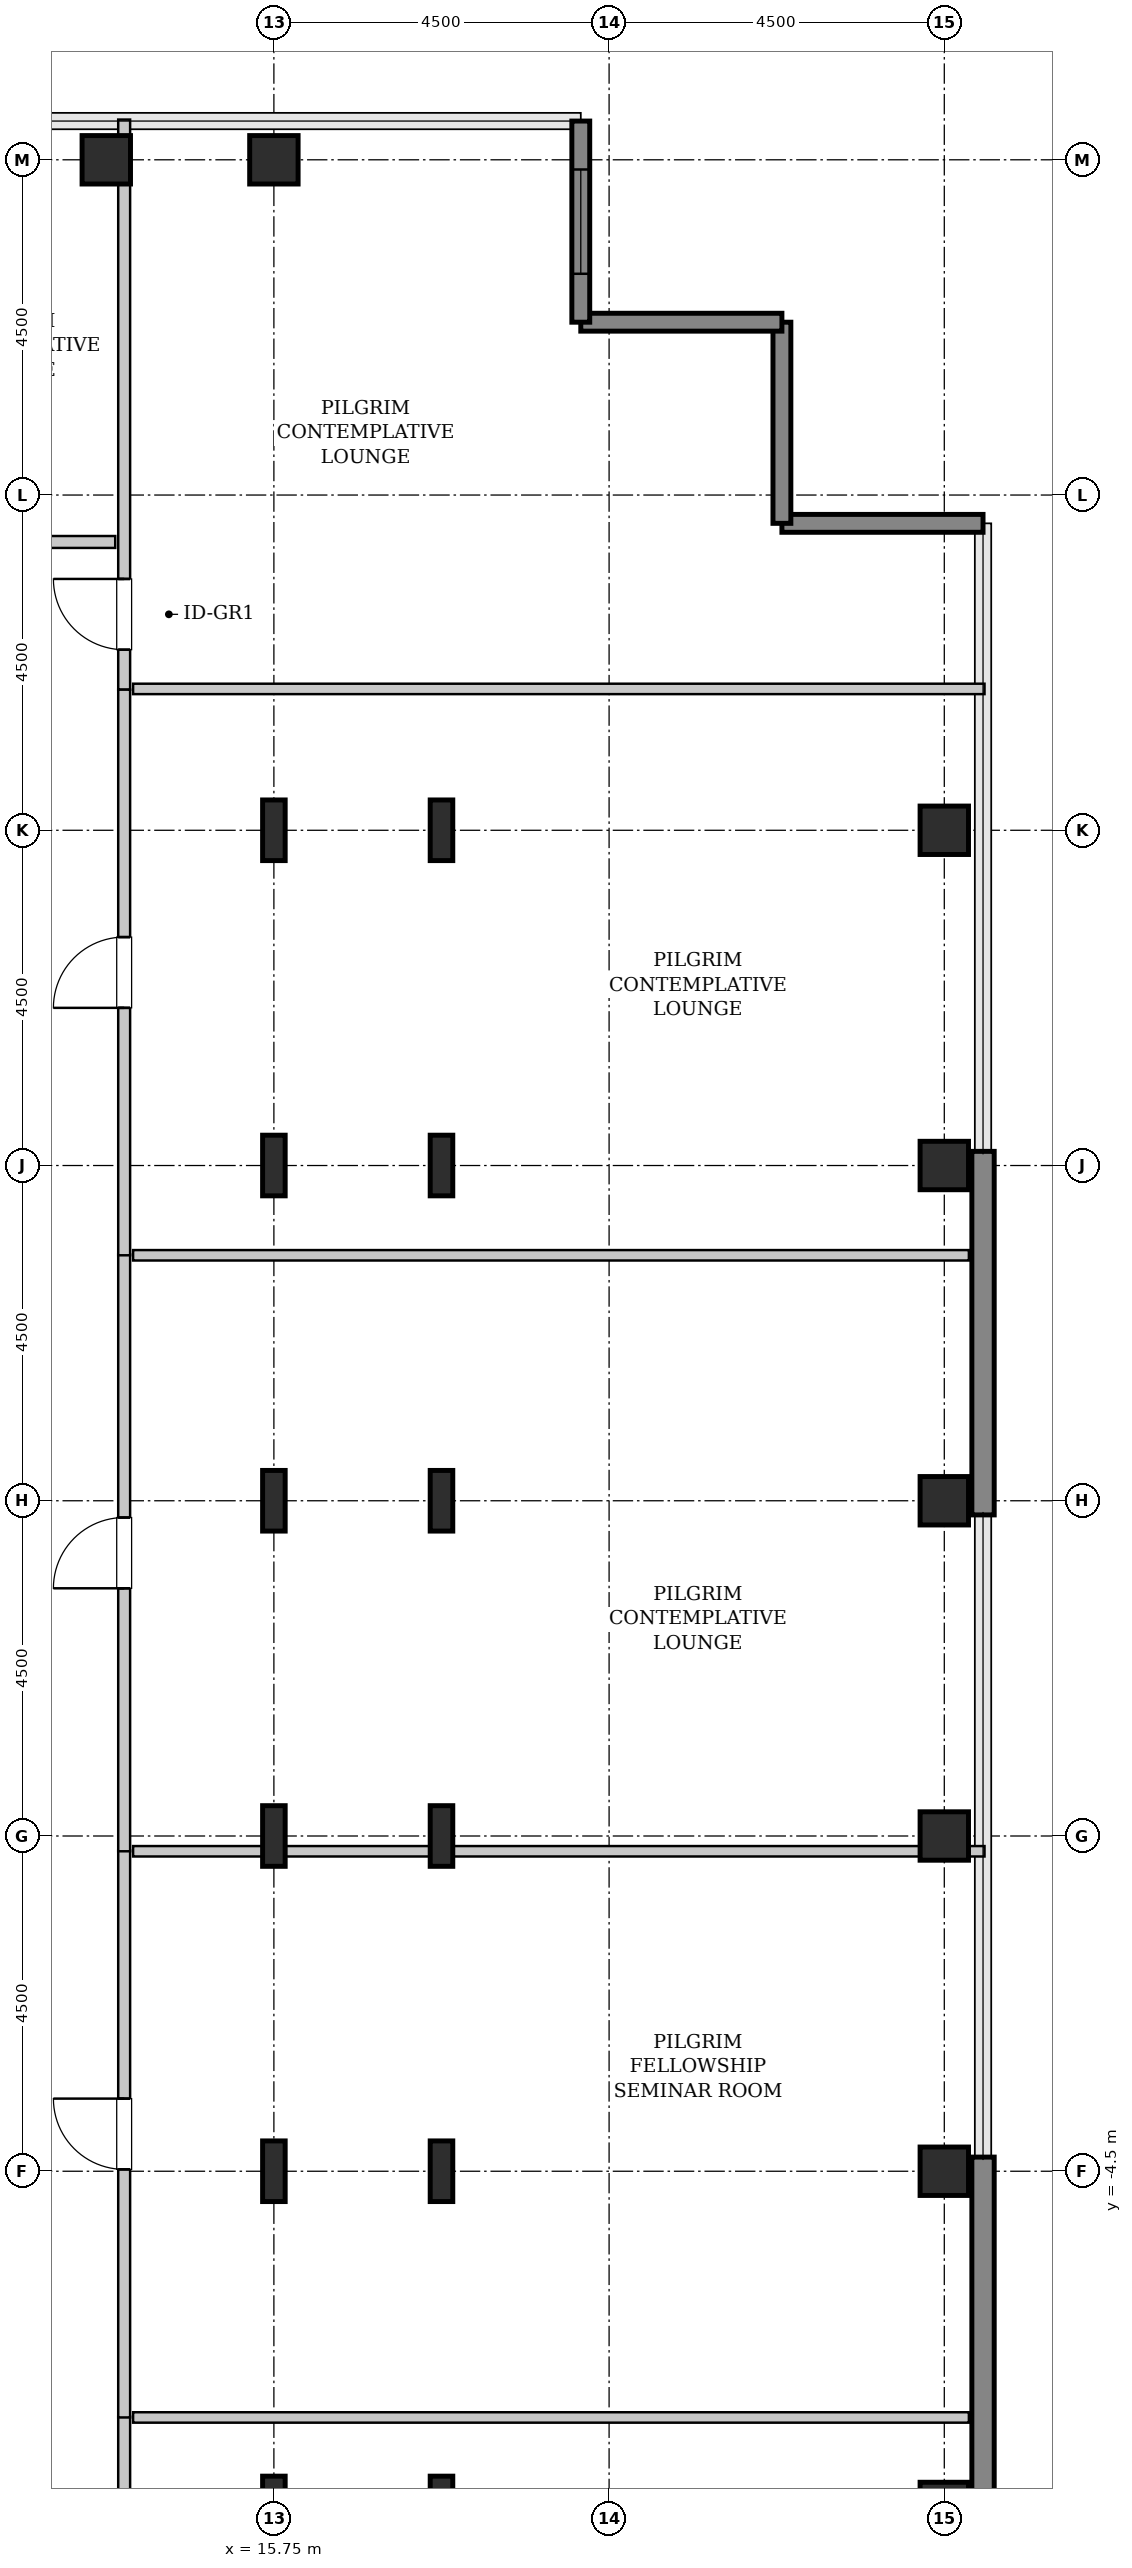
"""IFC4 building model, lengths in metres.
Left out: names, types, materials, properties, quantities, classifications, styles, units other than length and angle.
Written with IfcOpenShell. Run it as: python <this file> out.ifc"""

import sys

from ifc_helpers import new_model, si_unit, direction, frame, frame_2d, origin, origin_2d, place, context, subcontext, project, spatial, rectangle, hollow_rectangle, i_section, extrude, source, transform, mapped, element, fill, save


model = new_model("IFC4")
c1 = context("Model", 3, precision=1e-05, world=origin(), true_north=direction((0.0, 1.0)))
c2 = subcontext(c1, "Body", "Model", "MODEL_VIEW")
j1 = project(units=[si_unit("LENGTHUNIT", "METRE"), si_unit("PLANEANGLEUNIT", "RADIAN")], contexts=[c1])
p1 = place(None, origin())
s1 = spatial("IfcSite", under=j1, at=p1, CompositionType="ELEMENT")
p2 = place(p1, origin())
s2 = spatial("IfcBuilding", under=s1, at=p2, CompositionType="ELEMENT")
p3 = place(p2, frame((0.0, 0.0, 229.4)))
s3 = spatial("IfcBuildingStorey", under=s2, at=p3, CompositionType="ELEMENT", Elevation=229.4)
m1 = source(origin(), c2, "Body", "SweptSolid", [
    extrude(hollow_rectangle(XDim=0.65, YDim=0.65, WallThickness=0.032, InnerFilletRadius=0.032, OuterFilletRadius=0.064, at=origin_2d()), origin(), (0.0, 0.0, 1.0), 3.8),
])
p4 = place(p3, frame((13.5, 22.5, 0.0), z_axis=(0.0, 0.0, 1.0), x_axis=(1.0, 0.0, 0.0)))
e1 = element("IfcColumn", 1, at=p4, inside=s3, PredefinedType="COLUMN", context=c2, shape_type="MappedRepresentation", body=[
    mapped(m1, transform((0.0, 0.0, 0.0), x_axis=(1.0, 0.0, 0.0), y_axis=(0.0, 1.0, 0.0), z_axis=(0.0, 0.0, 1.0), scale=1.0)),
])
m2 = source(origin(), c2, "Body", "SweptSolid", [
    extrude(i_section(OverallWidth=0.303, OverallDepth=0.814, WebThickness=0.021, FlangeThickness=0.04, FilletRadius=0.03, at=origin_2d()), origin(), (0.0, 0.0, 1.0), 3.8),
])
for number, where, z_axis, x_axis in (
    (2, (15.75, -9.0, 0.0), (0.0, 0.0, 1.0), (1.0, 0.0, 0.0)),
    (3, (15.75, -4.5, 0.0), (0.0, 0.0, 1.0), (1.0, 0.0, 0.0)),
    (4, (15.75, 0.0, 0.0), (0.0, 0.0, 1.0), (1.0, 0.0, 0.0)),
    (5, (15.75, 4.5, 0.0), (0.0, 0.0, 1.0), (1.0, 0.0, 0.0)),
    (6, (15.75, 9.0, 0.0), (0.0, 0.0, 1.0), (1.0, 0.0, 0.0)),
    (7, (15.75, 13.5, 0.0), (0.0, 0.0, 1.0), (1.0, 0.0, 0.0)),
):
    element("IfcColumn", number, at=place(p3, frame(where, z_axis=z_axis, x_axis=x_axis)), inside=s3, PredefinedType="COLUMN", context=c2, shape_type="MappedRepresentation", body=[
        mapped(m2, transform((0.0, 0.0, 0.0), x_axis=(1.0, 0.0, 0.0), y_axis=(0.0, 1.0, 0.0), z_axis=(0.0, 0.0, 1.0), scale=1.0)),
    ])
p5 = place(p3, frame((15.75, 22.5, 0.0), z_axis=(0.0, 0.0, 1.0), x_axis=(1.0, 0.0, 0.0)))
e8 = element("IfcColumn", 8, at=p5, inside=s3, PredefinedType="COLUMN", context=c2, shape_type="MappedRepresentation", body=[
    mapped(m1, transform((0.0, 0.0, 0.0), x_axis=(1.0, 0.0, 0.0), y_axis=(0.0, 1.0, 0.0), z_axis=(0.0, 0.0, 1.0), scale=1.0)),
])
for number, where, z_axis, x_axis in (
    (9, (18.0, -9.0, 0.0), (0.0, 0.0, 1.0), (1.0, 0.0, 0.0)),
    (10, (18.0, -4.5, 0.0), (0.0, 0.0, 1.0), (1.0, 0.0, 0.0)),
    (11, (18.0, 0.0, 0.0), (0.0, 0.0, 1.0), (1.0, 0.0, 0.0)),
    (12, (18.0, 4.5, 0.0), (0.0, 0.0, 1.0), (1.0, 0.0, 0.0)),
    (13, (18.0, 9.0, 0.0), (0.0, 0.0, 1.0), (1.0, 0.0, 0.0)),
    (14, (18.0, 13.5, 0.0), (0.0, 0.0, 1.0), (1.0, 0.0, 0.0)),
):
    element("IfcColumn", number, at=place(p3, frame(where, z_axis=z_axis, x_axis=x_axis)), inside=s3, PredefinedType="COLUMN", context=c2, shape_type="MappedRepresentation", body=[
        mapped(m2, transform((0.0, 0.0, 0.0), x_axis=(1.0, 0.0, 0.0), y_axis=(0.0, 1.0, 0.0), z_axis=(0.0, 0.0, 1.0), scale=1.0)),
    ])
for number, where, z_axis, x_axis in (
    (15, (24.75, -9.0, 0.0), (0.0, 0.0, 1.0), (1.0, 0.0, 0.0)),
    (16, (24.75, -4.5, 0.0), (0.0, 0.0, 1.0), (1.0, 0.0, 0.0)),
    (17, (24.75, 0.0, 0.0), (0.0, 0.0, 1.0), (1.0, 0.0, 0.0)),
    (18, (24.75, 4.5, 0.0), (0.0, 0.0, 1.0), (1.0, 0.0, 0.0)),
    (19, (24.75, 9.0, 0.0), (0.0, 0.0, 1.0), (1.0, 0.0, 0.0)),
    (20, (24.75, 13.5, 0.0), (0.0, 0.0, 1.0), (1.0, 0.0, 0.0)),
):
    element("IfcColumn", number, at=place(p3, frame(where, z_axis=z_axis, x_axis=x_axis)), inside=s3, PredefinedType="COLUMN", context=c2, shape_type="MappedRepresentation", body=[
        mapped(m1, transform((0.0, 0.0, 0.0), x_axis=(1.0, 0.0, 0.0), y_axis=(0.0, 1.0, 0.0), z_axis=(0.0, 0.0, 1.0), scale=1.0)),
    ])
m3 = source(origin(), c2, "Body", "SweptSolid", [
    extrude(rectangle(XDim=4.88, YDim=0.3, at=frame_2d((2.44, 0.0))), origin(), (0.0, 0.0, 1.0), 3.55),
])
for number, where, z_axis, x_axis in (
    (21, (25.27, -9.19, 0.0), (0.0, 0.0, 1.0), (0.0, 1.0, 0.0)),
    (22, (25.27, 4.31, 0.0), (0.0, 0.0, 1.0), (0.0, 1.0, 0.0)),
):
    element("IfcWall", number, at=place(p3, frame(where, z_axis=z_axis, x_axis=x_axis)), inside=s3, PredefinedType="SHEAR", context=c2, shape_type="MappedRepresentation", body=[
        mapped(m3, transform((0.0, 0.0, 0.0), x_axis=(1.0, 0.0, 0.0), y_axis=(0.0, 1.0, 0.0), z_axis=(0.0, 0.0, 1.0), scale=1.0)),
    ])
m4 = source(origin(), c2, "Body", "SweptSolid", [
    extrude(rectangle(XDim=2.7, YDim=0.24, at=frame_2d((1.35, 0.0))), origin(), (0.0, 0.0, 1.0), 3.55),
])
for number, where, z_axis, x_axis in (
    (23, (25.27, 17.62, 0.0), (0.0, 0.0, 1.0), (-1.0, 0.0, 0.0)),
    (24, (22.57, 17.62, 0.0), (0.0, 0.0, 1.0), (0.0, 1.0, 0.0)),
    (25, (22.57, 20.32, 0.0), (0.0, 0.0, 1.0), (-1.0, 0.0, 0.0)),
):
    element("IfcWall", number, at=place(p3, frame(where, z_axis=z_axis, x_axis=x_axis)), inside=s3, PredefinedType="SHEAR", context=c2, shape_type="MappedRepresentation", body=[
        mapped(m4, transform((0.0, 0.0, 0.0), x_axis=(1.0, 0.0, 0.0), y_axis=(0.0, 1.0, 0.0), z_axis=(0.0, 0.0, 1.0), scale=1.0)),
    ])
p6 = place(p3, frame((19.87, 20.32, 0.0), z_axis=(0.0, 0.0, 1.0), x_axis=(0.0, 1.0, 0.0)))
e26 = element("IfcWall", 26, at=p6, inside=s3, PredefinedType="SHEAR", context=c2, shape_type="MappedRepresentation", body=[
    mapped(m4, transform((0.0, 0.0, 0.0), x_axis=(1.0, 0.0, 0.0), y_axis=(0.0, 1.0, 0.0), z_axis=(0.0, 0.0, 1.0), scale=1.0)),
])
p7 = place(p6, frame((0.65, 0.0, 0.85)))
e27 = element("IfcOpeningElement", 27, at=p7, cuts=e26, PredefinedType="OPENING", context=c2, shape_type="SweptSolid", body=[
    extrude(rectangle(XDim=1.4, YDim=1.8, at=frame_2d((0.7, 0.9))), frame((0.0, 0.13, 0.0), z_axis=(0.0, -1.0, 0.0), x_axis=(1.0, 0.0, 0.0)), (0.0, 0.0, 1.0), 0.26),
])
m5 = source(origin(), c2, "Body", "SweptSolid", [
    extrude(rectangle(XDim=7.593, YDim=0.16, at=frame_2d((3.796, 0.0))), origin(), (0.0, 0.0, 1.0), 3.535),
])
p8 = place(p3, frame((13.74, -15.387, 0.0), z_axis=(0.0, 0.0, 1.0), x_axis=(0.0, 1.0, 0.0)))
e28 = element("IfcWall", 28, at=p8, inside=s3, PredefinedType="PARTITIONING", context=c2, shape_type="MappedRepresentation", body=[
    mapped(m5, transform((0.0, 0.0, 0.0), x_axis=(1.0, 0.0, 0.0), y_axis=(0.0, 1.0, 0.0), z_axis=(0.0, 0.0, 1.0), scale=1.0)),
])
p9 = place(p8, frame((3.321, 0.0, 0.0)))
e29 = element("IfcOpeningElement", 29, at=p9, cuts=e28, PredefinedType="OPENING", context=c2, shape_type="SweptSolid", body=[
    extrude(rectangle(XDim=0.95, YDim=2.1, at=frame_2d((0.475, 1.05))), frame((0.0, 0.09, 0.0), z_axis=(0.0, -1.0, 0.0), x_axis=(1.0, 0.0, 0.0)), (0.0, 0.0, 1.0), 0.18),
])
m6 = source(origin(), c2, "Body", "SweptSolid", [
    extrude(rectangle(XDim=11.22, YDim=0.14, at=frame_2d((5.61, 0.0))), origin(), (0.0, 0.0, 1.0), 3.535),
])
p10 = place(p3, frame((13.86, -7.805, 0.0), z_axis=(0.0, 0.0, 1.0), x_axis=(1.0, 0.0, 0.0)))
e30 = element("IfcWall", 30, at=p10, inside=s3, PredefinedType="PARTITIONING", context=c2, shape_type="MappedRepresentation", body=[
    mapped(m6, transform((0.0, 0.0, 0.0), x_axis=(1.0, 0.0, 0.0), y_axis=(0.0, 1.0, 0.0), z_axis=(0.0, 0.0, 1.0), scale=1.0)),
])
m7 = source(origin(), c2, "Body", "SweptSolid", [
    extrude(rectangle(XDim=7.61, YDim=0.16, at=frame_2d((3.805, 0.0))), origin(), (0.0, 0.0, 1.0), 3.535),
])
p11 = place(p3, frame((13.74, -7.805, 0.0), z_axis=(0.0, 0.0, 1.0), x_axis=(0.0, 1.0, 0.0)))
e31 = element("IfcWall", 31, at=p11, inside=s3, PredefinedType="PARTITIONING", context=c2, shape_type="MappedRepresentation", body=[
    mapped(m7, transform((0.0, 0.0, 0.0), x_axis=(1.0, 0.0, 0.0), y_axis=(0.0, 1.0, 0.0), z_axis=(0.0, 0.0, 1.0), scale=1.0)),
])
p12 = place(p11, frame((3.33, 0.0, 0.0)))
e32 = element("IfcOpeningElement", 32, at=p12, cuts=e31, PredefinedType="OPENING", context=c2, shape_type="SweptSolid", body=[
    extrude(rectangle(XDim=0.95, YDim=2.1, at=frame_2d((0.475, 1.05))), frame((0.0, 0.09, 0.0), z_axis=(0.0, -1.0, 0.0), x_axis=(1.0, 0.0, 0.0)), (0.0, 0.0, 1.0), 0.18),
])
m8 = source(origin(), c2, "Body", "SweptSolid", [
    extrude(rectangle(XDim=11.43, YDim=0.14, at=frame_2d((5.715, 0.0))), origin(), (0.0, 0.0, 1.0), 2.925),
])
p13 = place(p3, frame((13.86, -0.205, 0.0), z_axis=(0.0, 0.0, 1.0), x_axis=(1.0, 0.0, 0.0)))
e33 = element("IfcWall", 33, at=p13, inside=s3, PredefinedType="PARTITIONING", context=c2, shape_type="MappedRepresentation", body=[
    mapped(m8, transform((0.0, 0.0, 0.0), x_axis=(1.0, 0.0, 0.0), y_axis=(0.0, 1.0, 0.0), z_axis=(0.0, 0.0, 1.0), scale=1.0)),
])
m9 = source(origin(), c2, "Body", "SweptSolid", [
    extrude(rectangle(XDim=8.01, YDim=0.16, at=frame_2d((4.005, 0.0))), origin(), (0.0, 0.0, 1.0), 3.535),
])
p14 = place(p3, frame((13.74, -0.205, 0.0), z_axis=(0.0, 0.0, 1.0), x_axis=(0.0, 1.0, 0.0)))
e34 = element("IfcWall", 34, at=p14, inside=s3, PredefinedType="PARTITIONING", context=c2, shape_type="MappedRepresentation", body=[
    mapped(m9, transform((0.0, 0.0, 0.0), x_axis=(1.0, 0.0, 0.0), y_axis=(0.0, 1.0, 0.0), z_axis=(0.0, 0.0, 1.0), scale=1.0)),
])
p15 = place(p14, frame((3.53, 0.0, 0.0)))
e35 = element("IfcOpeningElement", 35, at=p15, cuts=e34, PredefinedType="OPENING", context=c2, shape_type="SweptSolid", body=[
    extrude(rectangle(XDim=0.95, YDim=2.1, at=frame_2d((0.475, 1.05))), frame((0.0, 0.09, 0.0), z_axis=(0.0, -1.0, 0.0), x_axis=(1.0, 0.0, 0.0)), (0.0, 0.0, 1.0), 0.18),
])
p16 = place(p3, frame((13.86, 7.795, 0.0), z_axis=(0.0, 0.0, 1.0), x_axis=(1.0, 0.0, 0.0)))
e36 = element("IfcWall", 36, at=p16, inside=s3, PredefinedType="PARTITIONING", context=c2, shape_type="MappedRepresentation", body=[
    mapped(m6, transform((0.0, 0.0, 0.0), x_axis=(1.0, 0.0, 0.0), y_axis=(0.0, 1.0, 0.0), z_axis=(0.0, 0.0, 1.0), scale=1.0)),
])
m10 = source(origin(), c2, "Body", "SweptSolid", [
    extrude(rectangle(XDim=7.653, YDim=0.16, at=frame_2d((3.826, 0.0))), origin(), (0.0, 0.0, 1.0), 3.535),
])
p17 = place(p3, frame((13.74, 15.387, 0.0), z_axis=(0.0, 0.0, 1.0), x_axis=(0.0, 1.0, 0.0)))
e37 = element("IfcWall", 37, at=p17, inside=s3, PredefinedType="PARTITIONING", context=c2, shape_type="MappedRepresentation", body=[
    mapped(m10, transform((0.0, 0.0, 0.0), x_axis=(1.0, 0.0, 0.0), y_axis=(0.0, 1.0, 0.0), z_axis=(0.0, 0.0, 1.0), scale=1.0)),
])
p18 = place(p17, frame((0.536, 0.0, 0.0)))
e38 = element("IfcOpeningElement", 38, at=p18, cuts=e37, PredefinedType="OPENING", context=c2, shape_type="SweptSolid", body=[
    extrude(rectangle(XDim=0.95, YDim=2.1, at=frame_2d((0.475, 1.05))), frame((0.0, 0.09, 0.0), z_axis=(0.0, -1.0, 0.0), x_axis=(1.0, 0.0, 0.0)), (0.0, 0.0, 1.0), 0.18),
])
m11 = source(origin(), c2, "Body", "SweptSolid", [
    extrude(rectangle(XDim=11.43, YDim=0.14, at=frame_2d((5.715, 0.0))), origin(), (0.0, 0.0, 1.0), 3.535),
])
p19 = place(p3, frame((13.86, 15.397, 0.0), z_axis=(0.0, 0.0, 1.0), x_axis=(1.0, 0.0, 0.0)))
e39 = element("IfcWall", 39, at=p19, inside=s3, PredefinedType="PARTITIONING", context=c2, shape_type="MappedRepresentation", body=[
    mapped(m11, transform((0.0, 0.0, 0.0), x_axis=(1.0, 0.0, 0.0), y_axis=(0.0, 1.0, 0.0), z_axis=(0.0, 0.0, 1.0), scale=1.0)),
])
p20 = place(p3, frame((13.74, 7.795, 0.0), z_axis=(0.0, 0.0, 1.0), x_axis=(0.0, 1.0, 0.0)))
e40 = element("IfcWall", 40, at=p20, inside=s3, PredefinedType="PARTITIONING", context=c2, shape_type="MappedRepresentation", body=[
    mapped(m5, transform((0.0, 0.0, 0.0), x_axis=(1.0, 0.0, 0.0), y_axis=(0.0, 1.0, 0.0), z_axis=(0.0, 0.0, 1.0), scale=1.0)),
])
p21 = place(p20, frame((3.321, 0.0, 0.0)))
e41 = element("IfcOpeningElement", 41, at=p21, cuts=e40, PredefinedType="OPENING", context=c2, shape_type="SweptSolid", body=[
    extrude(rectangle(XDim=0.95, YDim=2.1, at=frame_2d((0.475, 1.05))), frame((0.0, 0.09, 0.0), z_axis=(0.0, -1.0, 0.0), x_axis=(1.0, 0.0, 0.0)), (0.0, 0.0, 1.0), 0.18),
])
m12 = source(origin(), c2, "Body", "SweptSolid", [
    extrude(rectangle(XDim=7.425, YDim=0.16, at=frame_2d((3.712, 0.0))), origin(), (0.0, 0.0, 1.0), 3.535),
])
p22 = place(p3, frame((6.195, 17.37, 0.0), z_axis=(0.0, 0.0, 1.0), x_axis=(1.0, 0.0, 0.0)))
e42 = element("IfcWall", 42, at=p22, inside=s3, PredefinedType="PARTITIONING", context=c2, shape_type="MappedRepresentation", body=[
    mapped(m12, transform((0.0, 0.0, 0.0), x_axis=(1.0, 0.0, 0.0), y_axis=(0.0, 1.0, 0.0), z_axis=(0.0, 0.0, 1.0), scale=1.0)),
])
p23 = place(p22, frame((3.238, 0.0, 0.0)))
e43 = element("IfcOpeningElement", 43, at=p23, cuts=e42, PredefinedType="OPENING", context=c2, shape_type="SweptSolid", body=[
    extrude(rectangle(XDim=0.95, YDim=2.1, at=frame_2d((0.475, 1.05))), frame((0.0, 0.09, 0.0), z_axis=(0.0, -1.0, 0.0), x_axis=(1.0, 0.0, 0.0)), (0.0, 0.0, 1.0), 0.18),
])
m13 = source(origin(), c2, "Body", "SweptSolid", [
    extrude(rectangle(XDim=1.4, YDim=1.8, at=frame_2d((0.7, 0.9))), frame((0.0, 0.03, 0.0), z_axis=(0.0, -1.0, 0.0), x_axis=(1.0, 0.0, 0.0)), (0.0, 0.0, 1.0), 0.06),
])
p24 = place(p7, origin())
e44 = element("IfcWindow", 44, at=p24, inside=s3, PartitioningType="SINGLE_PANEL", PredefinedType="WINDOW", context=c2, shape_type="MappedRepresentation", body=[
    mapped(m13, transform((0.0, 0.0, 0.0), x_axis=(1.0, 0.0, 0.0), y_axis=(0.0, 1.0, 0.0), z_axis=(0.0, 0.0, 1.0), scale=1.0)),
])
fill(e27, e44)
m14 = source(origin(), c2, "Body", "SweptSolid", [
    extrude(rectangle(XDim=0.95, YDim=2.1, at=frame_2d((0.475, 1.05))), frame((0.0, 0.025, 0.0), z_axis=(0.0, -1.0, 0.0), x_axis=(1.0, 0.0, 0.0)), (0.0, 0.0, 1.0), 0.05),
])
p25 = place(p12, origin())
e45 = element("IfcDoor", 45, at=p25, inside=s3, OperationType="SINGLE_SWING_RIGHT", PredefinedType="DOOR", context=c2, shape_type="MappedRepresentation", body=[
    mapped(m14, transform((0.0, 0.0, 0.0), x_axis=(1.0, 0.0, 0.0), y_axis=(0.0, 1.0, 0.0), z_axis=(0.0, 0.0, 1.0), scale=1.0)),
])
fill(e32, e45)
p26 = place(p15, origin())
e46 = element("IfcDoor", 46, at=p26, inside=s3, OperationType="SINGLE_SWING_LEFT", PredefinedType="DOOR", context=c2, shape_type="MappedRepresentation", body=[
    mapped(m14, transform((0.0, 0.0, 0.0), x_axis=(1.0, 0.0, 0.0), y_axis=(0.0, 1.0, 0.0), z_axis=(0.0, 0.0, 1.0), scale=1.0)),
])
fill(e35, e46)
p27 = place(p18, origin())
e47 = element("IfcDoor", 47, at=p27, inside=s3, OperationType="SINGLE_SWING_RIGHT", PredefinedType="DOOR", context=c2, shape_type="MappedRepresentation", body=[
    mapped(m14, transform((0.0, 0.0, 0.0), x_axis=(1.0, 0.0, 0.0), y_axis=(0.0, 1.0, 0.0), z_axis=(0.0, 0.0, 1.0), scale=1.0)),
])
fill(e38, e47)
p28 = place(p21, origin())
e48 = element("IfcDoor", 48, at=p28, inside=s3, OperationType="SINGLE_SWING_LEFT", PredefinedType="DOOR", context=c2, shape_type="MappedRepresentation", body=[
    mapped(m14, transform((0.0, 0.0, 0.0), x_axis=(1.0, 0.0, 0.0), y_axis=(0.0, 1.0, 0.0), z_axis=(0.0, 0.0, 1.0), scale=1.0)),
])
fill(e41, e48)
save(model, sys.argv[1])
